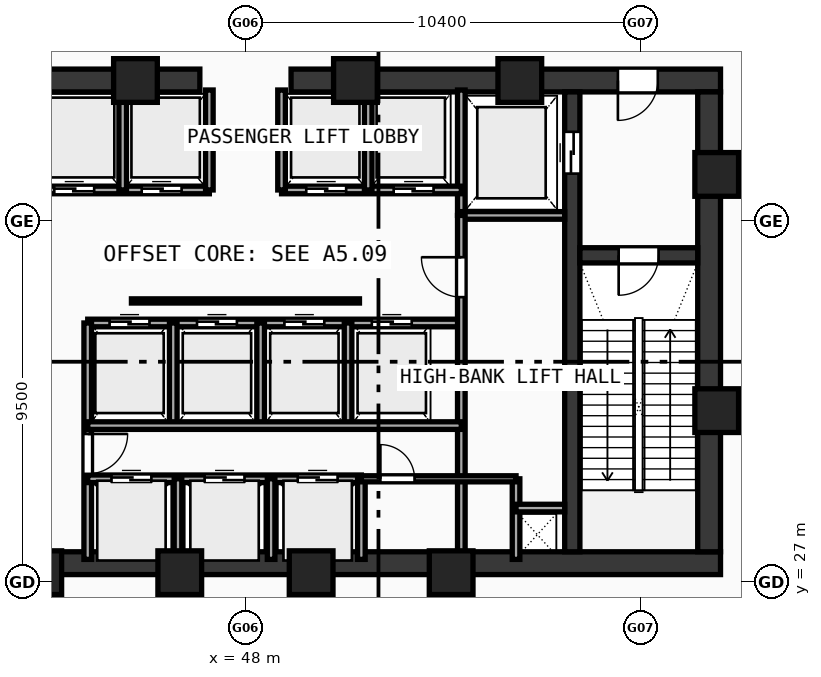
"""IFC4 building model, lengths in metres.
Left out: names, types, materials, properties, quantities, classifications, styles, units other than length and angle.
Written with IfcOpenShell. Run it as: python <this file> out.ifc"""

import sys

from ifc_helpers import new_model, si_unit, direction, frame, frame_2d, origin, origin_with_axes, origin_2d, place, context, subcontext, project, spatial, rectangle, hollow_rectangle, extrude, source, transform, mapped, element, fill, save


model = new_model("IFC4")
c1 = context("Model", 3, precision=1e-05, world=origin(), true_north=direction((0.0, 1.0)))
c2 = subcontext(c1, "Body", "Model", "MODEL_VIEW")
j1 = project(units=[si_unit("LENGTHUNIT", "METRE"), si_unit("PLANEANGLEUNIT", "RADIAN")], contexts=[c1])
p1 = place(None, origin())
s1 = spatial("IfcSite", under=j1, at=p1, CompositionType="ELEMENT")
p2 = place(p1, origin())
s2 = spatial("IfcBuilding", under=s1, at=p2, CompositionType="ELEMENT")
p3 = place(p2, frame((0.0, 0.0, 119.18)))
s3 = spatial("IfcBuildingStorey", under=s2, at=p3, CompositionType="ELEMENT", Elevation=119.18)
p4 = place(p3, frame((35.5, 27.5, 0.0), z_axis=(0.0, 0.0, 1.0), x_axis=(1.0, 0.0, 0.0)))
e1 = element("IfcWall", 1, at=p4, inside=s3, PredefinedType="SHEAR", context=c2, shape_type="SweptSolid", body=[
    extrude(rectangle(XDim=25.0, YDim=0.6, at=frame_2d((12.5, 0.0))), origin(), (0.0, 0.0, 1.0), 5.57),
])
p5 = place(p3, frame((35.5, 40.2, 0.0), z_axis=(0.0, 0.0, 1.0), x_axis=(1.0, 0.0, 0.0)))
e2 = element("IfcWall", 2, at=p5, inside=s3, PredefinedType="SHEAR", context=c2, shape_type="SweptSolid", body=[
    extrude(rectangle(XDim=11.3, YDim=0.6, at=frame_2d((5.65, 0.0))), origin(), (0.0, 0.0, 1.0), 5.57),
])
p6 = place(p5, frame((1.65, 0.0, 0.0)))
e3 = element("IfcOpeningElement", 3, at=p6, cuts=e2, PredefinedType="OPENING", context=c2, shape_type="SweptSolid", body=[
    extrude(rectangle(XDim=1.05, YDim=2.1, at=frame_2d((0.525, 1.05))), frame((0.0, 0.31, 0.0), z_axis=(0.0, -1.0, 0.0), x_axis=(1.0, 0.0, 0.0)), (0.0, 0.0, 1.0), 0.62),
])
p7 = place(p3, frame((49.2, 40.2, 0.0), z_axis=(0.0, 0.0, 1.0), x_axis=(1.0, 0.0, 0.0)))
e4 = element("IfcWall", 4, at=p7, inside=s3, PredefinedType="SHEAR", context=c2, shape_type="SweptSolid", body=[
    extrude(rectangle(XDim=11.3, YDim=0.6, at=frame_2d((5.65, 0.0))), origin(), (0.0, 0.0, 1.0), 5.57),
])
p8 = place(p7, frame((8.6, 0.0, 0.0)))
e5 = element("IfcOpeningElement", 5, at=p8, cuts=e4, PredefinedType="OPENING", context=c2, shape_type="SweptSolid", body=[
    extrude(rectangle(XDim=1.05, YDim=2.1, at=frame_2d((0.525, 1.05))), frame((0.0, 0.31, 0.0), z_axis=(0.0, -1.0, 0.0), x_axis=(1.0, 0.0, 0.0)), (0.0, 0.0, 1.0), 0.62),
])
p9 = place(p3, frame((60.2, 27.8, 0.0), z_axis=(0.0, 0.0, 1.0), x_axis=(0.0, 1.0, 0.0)))
e6 = element("IfcWall", 6, at=p9, inside=s3, PredefinedType="SHEAR", context=c2, shape_type="SweptSolid", body=[
    extrude(rectangle(XDim=12.1, YDim=0.6, at=frame_2d((6.05, 0.0))), origin(), (0.0, 0.0, 1.0), 5.57),
])
p10 = place(p3, frame((56.6, 27.8, 0.0), z_axis=(0.0, 0.0, 1.0), x_axis=(0.0, 1.0, 0.0)))
e7 = element("IfcWall", 7, at=p10, inside=s3, PredefinedType="SHEAR", context=c2, shape_type="SweptSolid", body=[
    extrude(rectangle(XDim=12.1, YDim=0.4, at=frame_2d((6.05, 0.0))), origin(), (0.0, 0.0, 1.0), 5.57),
])
p11 = place(p10, frame((9.95, 0.0, 0.0)))
e8 = element("IfcOpeningElement", 8, at=p11, cuts=e7, PredefinedType="OPENING", context=c2, shape_type="SweptSolid", body=[
    extrude(rectangle(XDim=1.1, YDim=2.1, at=frame_2d((0.55, 1.05))), frame((0.0, 0.21, 0.0), z_axis=(0.0, -1.0, 0.0), x_axis=(1.0, 0.0, 0.0)), (0.0, 0.0, 1.0), 0.42),
])
p12 = place(p3, frame((56.8, 35.6, 0.0), z_axis=(0.0, 0.0, 1.0), x_axis=(1.0, 0.0, 0.0)))
e9 = element("IfcWall", 9, at=p12, inside=s3, PredefinedType="SHEAR", context=c2, shape_type="SweptSolid", body=[
    extrude(rectangle(XDim=3.1, YDim=0.4, at=frame_2d((1.55, 0.0))), origin(), (0.0, 0.0, 1.0), 5.57),
])
p13 = place(p12, frame((1.02, 0.0, 0.0)))
e10 = element("IfcOpeningElement", 10, at=p13, cuts=e9, PredefinedType="OPENING", context=c2, shape_type="SweptSolid", body=[
    extrude(rectangle(XDim=1.05, YDim=2.1, at=frame_2d((0.525, 1.05))), frame((0.0, 0.21, 0.0), z_axis=(0.0, -1.0, 0.0), x_axis=(1.0, 0.0, 0.0)), (0.0, 0.0, 1.0), 0.42),
])
m1 = source(origin(), c2, "Body", "SweptSolid", [
    extrude(hollow_rectangle(XDim=1.15, YDim=1.15, WallThickness=0.048, at=origin_2d()), origin(), (0.0, 0.0, 1.0), 5.85),
])
for number, where, z_axis, x_axis in (
    (11, (42.588, 27.25, -0.28), (0.0, 0.0, 1.0), (1.0, 0.0, 0.0)),
    (12, (46.272, 27.25, -0.28), (0.0, 0.0, 1.0), (1.0, 0.0, 0.0)),
    (13, (49.729, 27.25, -0.28), (0.0, 0.0, 1.0), (1.0, 0.0, 0.0)),
    (14, (53.412, 27.25, -0.28), (0.0, 0.0, 1.0), (1.0, 0.0, 0.0)),
    (15, (60.4, 31.513, -0.28), (0.0, 0.0, 1.0), (1.0, 0.0, 0.0)),
    (16, (60.4, 37.729, -0.28), (0.0, 0.0, 1.0), (1.0, 0.0, 0.0)),
    (17, (55.219, 40.2, -0.28), (0.0, 0.0, 1.0), (1.0, 0.0, 0.0)),
    (18, (50.894, 40.2, -0.28), (0.0, 0.0, 1.0), (1.0, 0.0, 0.0)),
    (19, (45.106, 40.2, -0.28), (0.0, 0.0, 1.0), (1.0, 0.0, 0.0)),
):
    element("IfcColumn", number, at=place(p3, frame(where, z_axis=z_axis, x_axis=x_axis)), inside=s3, PredefinedType="COLUMN", context=c2, shape_type="MappedRepresentation", body=[
        mapped(m1, transform((0.0, 0.0, 0.0), scale=1.0)),
    ])
p14 = place(p3, frame((53.68, 36.65, 0.0), z_axis=(0.0, 0.0, 1.0), x_axis=(0.0, 1.0, 0.0)))
e20 = element("IfcWall", 20, at=p14, inside=s3, PredefinedType="SOLIDWALL", context=c2, shape_type="SweptSolid", body=[
    extrude(rectangle(XDim=3.3, YDim=0.2, at=frame_2d((1.65, 0.0))), origin(), (0.0, 0.0, 1.0), 5.57),
])
p15 = place(p3, frame((53.68, 36.65, 0.0), z_axis=(0.0, 0.0, 1.0), x_axis=(1.0, 0.0, 0.0)))
e21 = element("IfcWall", 21, at=p15, inside=s3, PredefinedType="SOLIDWALL", context=c2, shape_type="SweptSolid", body=[
    extrude(rectangle(XDim=2.72, YDim=0.2, at=frame_2d((1.36, 0.0))), origin(), (0.0, 0.0, 1.0), 5.57),
])
p16 = place(p3, frame((42.32, 37.32, 0.0), z_axis=(0.0, 0.0, 1.0), x_axis=(1.0, 0.0, 0.0)))
e22 = element("IfcWall", 22, at=p16, inside=s3, PredefinedType="SOLIDWALL", context=c2, shape_type="SweptSolid", body=[
    extrude(rectangle(XDim=4.73, YDim=0.2, at=frame_2d((2.365, 0.0))), origin(), (0.0, 0.0, 1.0), 5.57),
])
p17 = place(p16, frame((0.65, 0.0, 0.0)))
e23 = element("IfcOpeningElement", 23, at=p17, cuts=e22, PredefinedType="OPENING", context=c2, shape_type="SweptSolid", body=[
    extrude(rectangle(XDim=1.05, YDim=2.1, at=frame_2d((0.525, 1.05))), frame((0.0, 0.11, 0.0), z_axis=(0.0, -1.0, 0.0), x_axis=(1.0, 0.0, 0.0)), (0.0, 0.0, 1.0), 0.22),
])
p18 = place(p16, frame((2.95, 0.0, 0.0)))
e24 = element("IfcOpeningElement", 24, at=p18, cuts=e22, PredefinedType="OPENING", context=c2, shape_type="SweptSolid", body=[
    extrude(rectangle(XDim=1.05, YDim=2.1, at=frame_2d((0.525, 1.05))), frame((0.0, 0.11, 0.0), z_axis=(0.0, -1.0, 0.0), x_axis=(1.0, 0.0, 0.0)), (0.0, 0.0, 1.0), 0.22),
])
p19 = place(p3, frame((48.95, 37.32, 0.0), z_axis=(0.0, 0.0, 1.0), x_axis=(1.0, 0.0, 0.0)))
e25 = element("IfcWall", 25, at=p19, inside=s3, PredefinedType="SOLIDWALL", context=c2, shape_type="SweptSolid", body=[
    extrude(rectangle(XDim=4.73, YDim=0.2, at=frame_2d((2.365, 0.0))), origin(), (0.0, 0.0, 1.0), 5.57),
])
p20 = place(p19, frame((0.65, 0.0, 0.0)))
e26 = element("IfcOpeningElement", 26, at=p20, cuts=e25, PredefinedType="OPENING", context=c2, shape_type="SweptSolid", body=[
    extrude(rectangle(XDim=1.05, YDim=2.1, at=frame_2d((0.525, 1.05))), frame((0.0, 0.11, 0.0), z_axis=(0.0, -1.0, 0.0), x_axis=(1.0, 0.0, 0.0)), (0.0, 0.0, 1.0), 0.22),
])
p21 = place(p19, frame((2.95, 0.0, 0.0)))
e27 = element("IfcOpeningElement", 27, at=p21, cuts=e25, PredefinedType="OPENING", context=c2, shape_type="SweptSolid", body=[
    extrude(rectangle(XDim=1.05, YDim=2.1, at=frame_2d((0.525, 1.05))), frame((0.0, 0.11, 0.0), z_axis=(0.0, -1.0, 0.0), x_axis=(1.0, 0.0, 0.0)), (0.0, 0.0, 1.0), 0.22),
])
for number, where, z_axis, x_axis in (
    (28, (47.05, 37.32, 0.0), (0.0, 0.0, 1.0), (0.0, 1.0, 0.0)),
    (29, (48.95, 37.32, 0.0), (0.0, 0.0, 1.0), (0.0, 1.0, 0.0)),
):
    element("IfcWall", number, at=place(p3, frame(where, z_axis=z_axis, x_axis=x_axis)), inside=s3, PredefinedType="SOLIDWALL", context=c2, shape_type="SweptSolid", body=[
        extrude(rectangle(XDim=2.63, YDim=0.2, at=frame_2d((1.315, 0.0))), origin(), (0.0, 0.0, 1.0), 5.57),
    ])
for number, where, z_axis, x_axis in (
    (30, (44.77, 37.32, 0.0), (0.0, 0.0, 1.0), (0.0, 1.0, 0.0)),
    (31, (51.23, 37.32, 0.0), (0.0, 0.0, 1.0), (0.0, 1.0, 0.0)),
):
    element("IfcWall", number, at=place(p3, frame(where, z_axis=z_axis, x_axis=x_axis)), inside=s3, PredefinedType="SOLIDWALL", context=c2, shape_type="SweptSolid", body=[
        extrude(rectangle(XDim=2.63, YDim=0.2, at=frame_2d((1.315, 0.0))), origin(), (0.0, 0.0, 1.0), 2.22),
    ])
p22 = place(p3, frame((43.85, 33.82, 0.0), z_axis=(0.0, 0.0, 1.0), x_axis=(1.0, 0.0, 0.0)))
e32 = element("IfcWall", 32, at=p22, inside=s3, PredefinedType="SOLIDWALL", context=c2, shape_type="SweptSolid", body=[
    extrude(rectangle(XDim=9.83, YDim=0.2, at=frame_2d((4.915, 0.0))), origin(), (0.0, 0.0, 1.0), 5.57),
])
p23 = place(p22, frame((0.575, 0.0, 0.0)))
e33 = element("IfcOpeningElement", 33, at=p23, cuts=e32, PredefinedType="OPENING", context=c2, shape_type="SweptSolid", body=[
    extrude(rectangle(XDim=1.05, YDim=2.1, at=frame_2d((0.525, 1.05))), frame((0.0, 0.11, 0.0), z_axis=(0.0, -1.0, 0.0), x_axis=(1.0, 0.0, 0.0)), (0.0, 0.0, 1.0), 0.22),
])
p24 = place(p22, frame((2.875, 0.0, 0.0)))
e34 = element("IfcOpeningElement", 34, at=p24, cuts=e32, PredefinedType="OPENING", context=c2, shape_type="SweptSolid", body=[
    extrude(rectangle(XDim=1.05, YDim=2.1, at=frame_2d((0.525, 1.05))), frame((0.0, 0.11, 0.0), z_axis=(0.0, -1.0, 0.0), x_axis=(1.0, 0.0, 0.0)), (0.0, 0.0, 1.0), 0.22),
])
p25 = place(p22, frame((5.175, 0.0, 0.0)))
e35 = element("IfcOpeningElement", 35, at=p25, cuts=e32, PredefinedType="OPENING", context=c2, shape_type="SweptSolid", body=[
    extrude(rectangle(XDim=1.05, YDim=2.1, at=frame_2d((0.525, 1.05))), frame((0.0, 0.11, 0.0), z_axis=(0.0, -1.0, 0.0), x_axis=(1.0, 0.0, 0.0)), (0.0, 0.0, 1.0), 0.22),
])
p26 = place(p22, frame((7.475, 0.0, 0.0)))
e36 = element("IfcOpeningElement", 36, at=p26, cuts=e32, PredefinedType="OPENING", context=c2, shape_type="SweptSolid", body=[
    extrude(rectangle(XDim=1.05, YDim=2.1, at=frame_2d((0.525, 1.05))), frame((0.0, 0.11, 0.0), z_axis=(0.0, -1.0, 0.0), x_axis=(1.0, 0.0, 0.0)), (0.0, 0.0, 1.0), 0.22),
])
p27 = place(p3, frame((43.85, 27.6, 0.0), z_axis=(0.0, 0.0, 1.0), x_axis=(0.0, 1.0, 0.0)))
e37 = element("IfcWall", 37, at=p27, inside=s3, PredefinedType="SOLIDWALL", context=c2, shape_type="SweptSolid", body=[
    extrude(rectangle(XDim=6.22, YDim=0.2, at=frame_2d((3.11, 0.0))), origin(), (0.0, 0.0, 1.0), 5.57),
])
p28 = place(p27, frame((2.25, 0.0, 0.0)))
e38 = element("IfcOpeningElement", 38, at=p28, cuts=e37, PredefinedType="OPENING", context=c2, shape_type="SweptSolid", body=[
    extrude(rectangle(XDim=1.05, YDim=2.1, at=frame_2d((0.525, 1.05))), frame((0.0, 0.11, 0.0), z_axis=(0.0, -1.0, 0.0), x_axis=(1.0, 0.0, 0.0)), (0.0, 0.0, 1.0), 0.22),
])
p29 = place(p3, frame((53.68, 27.6, 0.0), z_axis=(0.0, 0.0, 1.0), x_axis=(0.0, 1.0, 0.0)))
e39 = element("IfcWall", 39, at=p29, inside=s3, PredefinedType="SOLIDWALL", context=c2, shape_type="SweptSolid", body=[
    extrude(rectangle(XDim=9.05, YDim=0.2, at=frame_2d((4.525, 0.0))), origin(), (0.0, 0.0, 1.0), 2.22),
])
p30 = place(p29, frame((6.9, 0.0, 0.0)))
e40 = element("IfcOpeningElement", 40, at=p30, cuts=e39, PredefinedType="OPENING", context=c2, shape_type="SweptSolid", body=[
    extrude(rectangle(XDim=1.05, YDim=2.1, at=frame_2d((0.525, 1.05))), frame((0.0, 0.11, 0.0), z_axis=(0.0, -1.0, 0.0), x_axis=(1.0, 0.0, 0.0)), (0.0, 0.0, 1.0), 0.22),
])
for number, where, z_axis, x_axis in (
    (41, (46.1, 31.12, 0.0), (0.0, 0.0, 1.0), (0.0, 1.0, 0.0)),
    (42, (48.4, 31.12, 0.0), (0.0, 0.0, 1.0), (0.0, 1.0, 0.0)),
    (43, (50.7, 31.12, 0.0), (0.0, 0.0, 1.0), (0.0, 1.0, 0.0)),
):
    element("IfcWall", number, at=place(p3, frame(where, z_axis=z_axis, x_axis=x_axis)), inside=s3, PredefinedType="SOLIDWALL", context=c2, shape_type="SweptSolid", body=[
        extrude(rectangle(XDim=2.7, YDim=0.2, at=frame_2d((1.35, 0.0))), origin(), (0.0, 0.0, 1.0), 5.57),
    ])
p31 = place(p3, frame((43.85, 29.72, 0.0), z_axis=(0.0, 0.0, 1.0), x_axis=(1.0, 0.0, 0.0)))
e44 = element("IfcWall", 44, at=p31, inside=s3, PredefinedType="SOLIDWALL", context=c2, shape_type="SweptSolid", body=[
    extrude(rectangle(XDim=7.2, YDim=0.2, at=frame_2d((3.6, 0.0))), origin(), (0.0, 0.0, 1.0), 5.57),
])
p32 = place(p31, frame((0.625, 0.0, 0.0)))
e45 = element("IfcOpeningElement", 45, at=p32, cuts=e44, PredefinedType="OPENING", context=c2, shape_type="SweptSolid", body=[
    extrude(rectangle(XDim=1.05, YDim=2.1, at=frame_2d((0.525, 1.05))), frame((0.0, 0.11, 0.0), z_axis=(0.0, -1.0, 0.0), x_axis=(1.0, 0.0, 0.0)), (0.0, 0.0, 1.0), 0.22),
])
p33 = place(p31, frame((3.075, 0.0, 0.0)))
e46 = element("IfcOpeningElement", 46, at=p33, cuts=e44, PredefinedType="OPENING", context=c2, shape_type="SweptSolid", body=[
    extrude(rectangle(XDim=1.05, YDim=2.1, at=frame_2d((0.525, 1.05))), frame((0.0, 0.11, 0.0), z_axis=(0.0, -1.0, 0.0), x_axis=(1.0, 0.0, 0.0)), (0.0, 0.0, 1.0), 0.22),
])
p34 = place(p31, frame((5.525, 0.0, 0.0)))
e47 = element("IfcOpeningElement", 47, at=p34, cuts=e44, PredefinedType="OPENING", context=c2, shape_type="SweptSolid", body=[
    extrude(rectangle(XDim=1.05, YDim=2.1, at=frame_2d((0.525, 1.05))), frame((0.0, 0.11, 0.0), z_axis=(0.0, -1.0, 0.0), x_axis=(1.0, 0.0, 0.0)), (0.0, 0.0, 1.0), 0.22),
])
p35 = place(p3, frame((51.05, 27.6, 0.0), z_axis=(0.0, 0.0, 1.0), x_axis=(0.0, 1.0, 0.0)))
e48 = element("IfcWall", 48, at=p35, inside=s3, PredefinedType="SOLIDWALL", context=c2, shape_type="SweptSolid", body=[
    extrude(rectangle(XDim=2.12, YDim=0.2, at=frame_2d((1.06, 0.0))), origin(), (0.0, 0.0, 1.0), 5.57),
])
p36 = place(p3, frame((43.85, 31.12, 0.0), z_axis=(0.0, 0.0, 1.0), x_axis=(1.0, 0.0, 0.0)))
e49 = element("IfcWall", 49, at=p36, inside=s3, PredefinedType="SOLIDWALL", context=c2, shape_type="SweptSolid", body=[
    extrude(rectangle(XDim=9.83, YDim=0.2, at=frame_2d((4.915, 0.0))), origin(), (0.0, 0.0, 1.0), 5.57),
])
p37 = place(p3, frame((46.225, 27.6, 0.0), z_axis=(0.0, 0.0, 1.0), x_axis=(0.0, 1.0, 0.0)))
e50 = element("IfcWall", 50, at=p37, inside=s3, PredefinedType="SOLIDWALL", context=c2, shape_type="SweptSolid", body=[
    extrude(rectangle(XDim=2.12, YDim=0.2, at=frame_2d((1.06, 0.0))), origin(), (0.0, 0.0, 1.0), 2.22),
])
for number, where, z_axis, x_axis in (
    (51, (48.675, 27.6, 0.0), (0.0, 0.0, 1.0), (0.0, 1.0, 0.0)),
    (52, (55.12, 27.6, 0.0), (0.0, 0.0, 1.0), (0.0, 1.0, 0.0)),
):
    element("IfcWall", number, at=place(p3, frame(where, z_axis=z_axis, x_axis=x_axis)), inside=s3, PredefinedType="SOLIDWALL", context=c2, shape_type="SweptSolid", body=[
        extrude(rectangle(XDim=2.12, YDim=0.2, at=frame_2d((1.06, 0.0))), origin(), (0.0, 0.0, 1.0), 5.57),
    ])
p38 = place(p3, frame((55.12, 28.95, 0.0), z_axis=(0.0, 0.0, 1.0), x_axis=(1.0, 0.0, 0.0)))
e53 = element("IfcWall", 53, at=p38, inside=s3, PredefinedType="SOLIDWALL", context=c2, shape_type="SweptSolid", body=[
    extrude(rectangle(XDim=1.28, YDim=0.2, at=frame_2d((0.64, 0.0))), origin(), (0.0, 0.0, 1.0), 5.57),
])
p39 = place(p3, frame((51.05, 29.72, 0.0), z_axis=(0.0, 0.0, 1.0), x_axis=(1.0, 0.0, 0.0)))
e54 = element("IfcWall", 54, at=p39, inside=s3, PredefinedType="PARTITIONING", context=c2, shape_type="SweptSolid", body=[
    extrude(rectangle(XDim=4.07, YDim=0.16, at=frame_2d((2.035, 0.0))), origin(), (0.0, 0.0, 1.0), 5.57),
])
p40 = place(p39, frame((0.5, 0.0, 0.0)))
e55 = element("IfcOpeningElement", 55, at=p40, cuts=e54, PredefinedType="OPENING", context=c2, shape_type="SweptSolid", body=[
    extrude(rectangle(XDim=0.9, YDim=2.1, at=frame_2d((0.45, 1.05))), frame((0.0, 0.09, 0.0), z_axis=(0.0, -1.0, 0.0), x_axis=(1.0, 0.0, 0.0)), (0.0, 0.0, 1.0), 0.18),
])
p41 = place(p3, frame((45.0, 34.4, 0.0), z_axis=(0.0, 0.0, 1.0), x_axis=(1.0, 0.0, 0.0)))
e56 = element("IfcWall", 56, at=p41, inside=s3, PredefinedType="MOVABLE", context=c2, shape_type="SweptSolid", body=[
    extrude(rectangle(XDim=6.0, YDim=0.11, at=frame_2d((3.0, 0.0))), origin(), (0.0, 0.0, 1.0), 2.5),
])
m2 = source(origin(), c2, "Body", "SweptSolid", [
    extrude(rectangle(XDim=1.05, YDim=2.1, at=frame_2d((0.525, 1.05))), frame((0.0, 0.025, 0.0), z_axis=(0.0, -1.0, 0.0), x_axis=(1.0, 0.0, 0.0)), (0.0, 0.0, 1.0), 0.05),
])
p42 = place(p13, frame((1.05, 0.0, 0.0), z_axis=(0.0, 0.0, 1.0), x_axis=(-1.0, 0.0, 0.0)))
e57 = element("IfcDoor", 57, at=p42, inside=s3, OperationType="SINGLE_SWING_RIGHT", PredefinedType="DOOR", context=c2, shape_type="MappedRepresentation", body=[
    mapped(m2, transform((0.0, 0.0, 0.0), scale=1.0)),
])
fill(e10, e57)
p43 = place(p8, frame((1.05, 0.0, 0.0), z_axis=(0.0, 0.0, 1.0), x_axis=(-1.0, 0.0, 0.0)))
e58 = element("IfcDoor", 58, at=p43, inside=s3, OperationType="SINGLE_SWING_RIGHT", PredefinedType="DOOR", context=c2, shape_type="MappedRepresentation", body=[
    mapped(m2, transform((0.0, 0.0, 0.0), scale=1.0)),
])
fill(e5, e58)
m3 = source(origin(), c2, "Body", "SweptSolid", [
    extrude(rectangle(XDim=1.1, YDim=2.1, at=frame_2d((0.55, 1.05))), frame((0.0, 0.025, 0.0), z_axis=(0.0, -1.0, 0.0), x_axis=(1.0, 0.0, 0.0)), (0.0, 0.0, 1.0), 0.05),
])
p44 = place(p11, origin_with_axes())
e59 = element("IfcDoor", 59, at=p44, inside=s3, OperationType="DOUBLE_DOOR_SLIDING", PredefinedType="DOOR", context=c2, shape_type="MappedRepresentation", body=[
    mapped(m3, transform((0.0, 0.0, 0.0), scale=1.0)),
])
fill(e8, e59)
p45 = place(p17, frame((1.05, 0.0, 0.0), z_axis=(0.0, 0.0, 1.0), x_axis=(-1.0, 0.0, 0.0)))
e60 = element("IfcDoor", 60, at=p45, inside=s3, OperationType="DOUBLE_DOOR_SLIDING", PredefinedType="DOOR", context=c2, shape_type="MappedRepresentation", body=[
    mapped(m2, transform((0.0, 0.0, 0.0), scale=1.0)),
])
fill(e23, e60)
p46 = place(p18, frame((1.05, 0.0, 0.0), z_axis=(0.0, 0.0, 1.0), x_axis=(-1.0, 0.0, 0.0)))
e61 = element("IfcDoor", 61, at=p46, inside=s3, OperationType="DOUBLE_DOOR_SLIDING", PredefinedType="DOOR", context=c2, shape_type="MappedRepresentation", body=[
    mapped(m2, transform((0.0, 0.0, 0.0), scale=1.0)),
])
fill(e24, e61)
p47 = place(p20, frame((1.05, 0.0, 0.0), z_axis=(0.0, 0.0, 1.0), x_axis=(-1.0, 0.0, 0.0)))
e62 = element("IfcDoor", 62, at=p47, inside=s3, OperationType="DOUBLE_DOOR_SLIDING", PredefinedType="DOOR", context=c2, shape_type="MappedRepresentation", body=[
    mapped(m2, transform((0.0, 0.0, 0.0), scale=1.0)),
])
fill(e26, e62)
p48 = place(p21, frame((1.05, 0.0, 0.0), z_axis=(0.0, 0.0, 1.0), x_axis=(-1.0, 0.0, 0.0)))
e63 = element("IfcDoor", 63, at=p48, inside=s3, OperationType="DOUBLE_DOOR_SLIDING", PredefinedType="DOOR", context=c2, shape_type="MappedRepresentation", body=[
    mapped(m2, transform((0.0, 0.0, 0.0), scale=1.0)),
])
fill(e27, e63)
p49 = place(p23, origin_with_axes())
e64 = element("IfcDoor", 64, at=p49, inside=s3, OperationType="DOUBLE_DOOR_SLIDING", PredefinedType="DOOR", context=c2, shape_type="MappedRepresentation", body=[
    mapped(m2, transform((0.0, 0.0, 0.0), scale=1.0)),
])
fill(e33, e64)
p50 = place(p24, origin_with_axes())
e65 = element("IfcDoor", 65, at=p50, inside=s3, OperationType="DOUBLE_DOOR_SLIDING", PredefinedType="DOOR", context=c2, shape_type="MappedRepresentation", body=[
    mapped(m2, transform((0.0, 0.0, 0.0), scale=1.0)),
])
fill(e34, e65)
p51 = place(p25, origin_with_axes())
e66 = element("IfcDoor", 66, at=p51, inside=s3, OperationType="DOUBLE_DOOR_SLIDING", PredefinedType="DOOR", context=c2, shape_type="MappedRepresentation", body=[
    mapped(m2, transform((0.0, 0.0, 0.0), scale=1.0)),
])
fill(e35, e66)
p52 = place(p26, origin_with_axes())
e67 = element("IfcDoor", 67, at=p52, inside=s3, OperationType="DOUBLE_DOOR_SLIDING", PredefinedType="DOOR", context=c2, shape_type="MappedRepresentation", body=[
    mapped(m2, transform((0.0, 0.0, 0.0), scale=1.0)),
])
fill(e36, e67)
p53 = place(p28, frame((1.05, 0.0, 0.0), z_axis=(0.0, 0.0, 1.0), x_axis=(-1.0, 0.0, 0.0)))
e68 = element("IfcDoor", 68, at=p53, inside=s3, OperationType="SINGLE_SWING_LEFT", PredefinedType="DOOR", context=c2, shape_type="MappedRepresentation", body=[
    mapped(m2, transform((0.0, 0.0, 0.0), scale=1.0)),
])
fill(e38, e68)
p54 = place(p30, origin_with_axes())
e69 = element("IfcDoor", 69, at=p54, inside=s3, OperationType="SINGLE_SWING_RIGHT", PredefinedType="DOOR", context=c2, shape_type="MappedRepresentation", body=[
    mapped(m2, transform((0.0, 0.0, 0.0), scale=1.0)),
])
fill(e40, e69)
p55 = place(p32, origin_with_axes())
e70 = element("IfcDoor", 70, at=p55, inside=s3, OperationType="DOUBLE_DOOR_SLIDING", PredefinedType="DOOR", context=c2, shape_type="MappedRepresentation", body=[
    mapped(m2, transform((0.0, 0.0, 0.0), scale=1.0)),
])
fill(e45, e70)
p56 = place(p33, origin_with_axes())
e71 = element("IfcDoor", 71, at=p56, inside=s3, OperationType="DOUBLE_DOOR_SLIDING", PredefinedType="DOOR", context=c2, shape_type="MappedRepresentation", body=[
    mapped(m2, transform((0.0, 0.0, 0.0), scale=1.0)),
])
fill(e46, e71)
p57 = place(p34, origin_with_axes())
e72 = element("IfcDoor", 72, at=p57, inside=s3, OperationType="DOUBLE_DOOR_SLIDING", PredefinedType="DOOR", context=c2, shape_type="MappedRepresentation", body=[
    mapped(m2, transform((0.0, 0.0, 0.0), scale=1.0)),
])
fill(e47, e72)
m4 = source(origin(), c2, "Body", "SweptSolid", [
    extrude(rectangle(XDim=0.9, YDim=2.1, at=frame_2d((0.45, 1.05))), frame((0.0, 0.025, 0.0), z_axis=(0.0, -1.0, 0.0), x_axis=(1.0, 0.0, 0.0)), (0.0, 0.0, 1.0), 0.05),
])
p58 = place(p40, origin_with_axes())
e73 = element("IfcDoor", 73, at=p58, inside=s3, OperationType="SINGLE_SWING_LEFT", PredefinedType="DOOR", context=c2, shape_type="MappedRepresentation", body=[
    mapped(m4, transform((0.0, 0.0, 0.0), scale=1.0)),
])
fill(e55, e73)
save(model, sys.argv[1])
